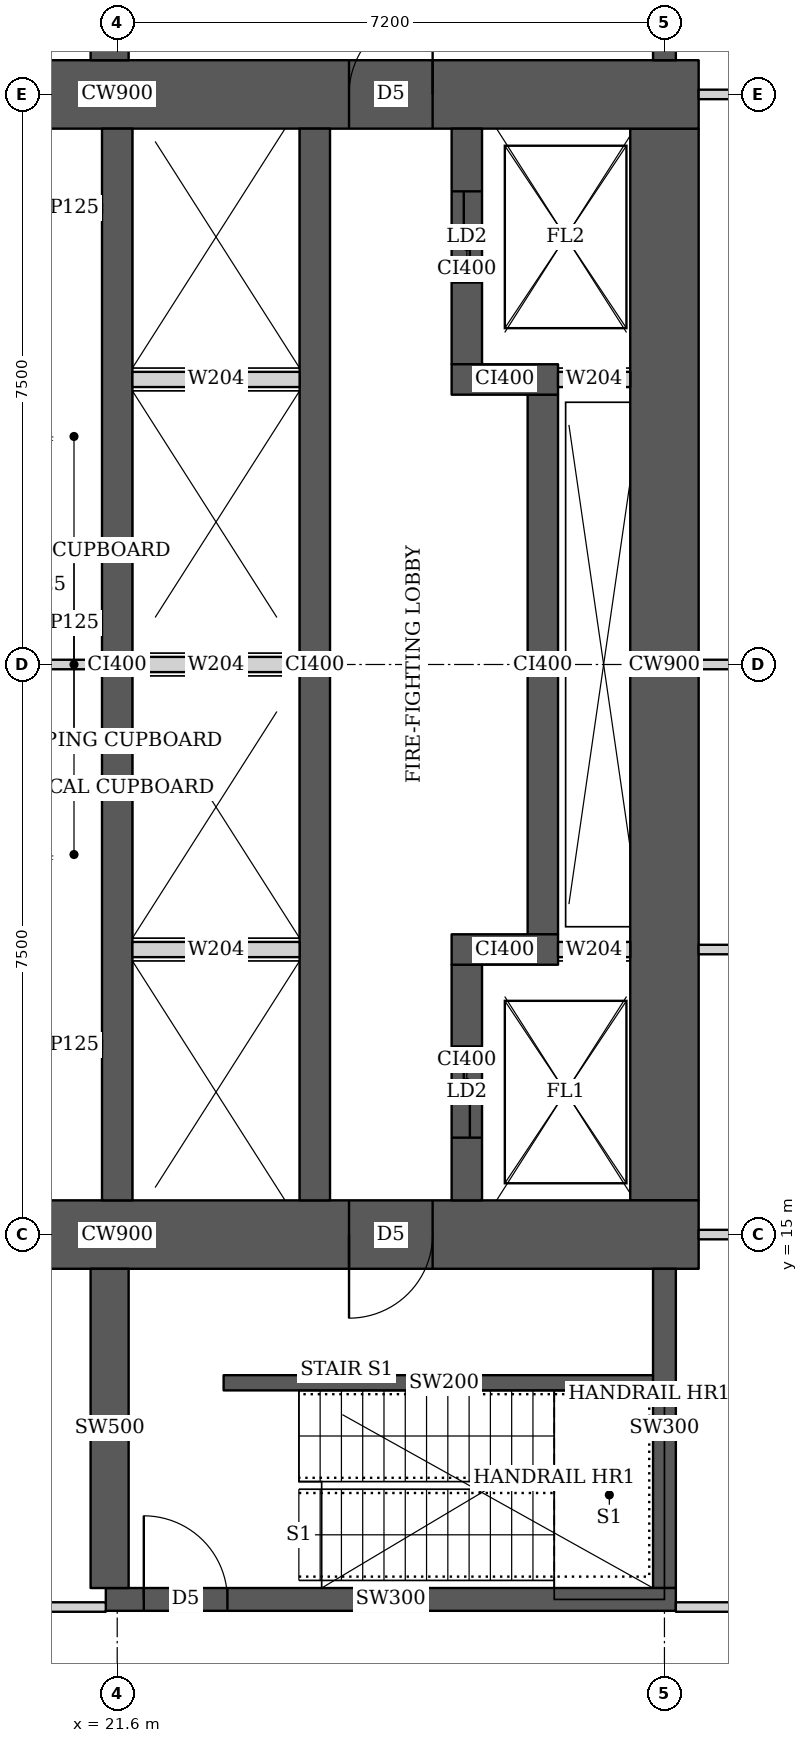
"""IFC4 building model, lengths in metres.
Left out: names, types, materials, properties, quantities, classifications, styles, units other than length and angle.
Written with IfcOpenShell. Run it as: python <this file> out.ifc"""

import sys

from ifc_helpers import new_model, si_unit, direction, frame, frame_2d, origin, place, context, subcontext, project, spatial, rectangle, extrude, element, fill, save


model = new_model("IFC4")
c1 = context("Model", 3, precision=1e-05, world=origin(), true_north=direction((0.0, 1.0)))
c2 = subcontext(c1, "Body", "Model", "MODEL_VIEW")
j1 = project(units=[si_unit("LENGTHUNIT", "METRE"), si_unit("PLANEANGLEUNIT", "RADIAN")], contexts=[c1])
p1 = place(None, origin())
s1 = spatial("IfcSite", under=j1, at=p1, CompositionType="ELEMENT")
p2 = place(p1, origin())
s2 = spatial("IfcBuilding", under=s1, at=p2, CompositionType="ELEMENT")
p3 = place(p2, frame((0.0, 0.0, 10.1)))
s3 = spatial("IfcBuildingStorey", under=s2, at=p3, CompositionType="ELEMENT", Elevation=10.1)
p4 = place(p3, frame((13.95, 15.0, 0.0), z_axis=(0.0, 0.0, 1.0), x_axis=(1.0, 0.0, 0.0)))
e1 = element("IfcWall", 1, at=p4, inside=s3, PredefinedType="SHEAR", context=c2, shape_type="SweptSolid", body=[
    extrude(rectangle(XDim=15.3, YDim=0.9, at=frame_2d((7.65, 0.0))), origin(), (0.0, 0.0, 1.0), 4.5),
])
p5 = place(p4, frame((4.45, 0.0, 0.0)))
e2 = element("IfcOpeningElement", 2, at=p5, cuts=e1, PredefinedType="OPENING", context=c2, shape_type="SweptSolid", body=[
    extrude(rectangle(XDim=1.8, YDim=2.1, at=frame_2d((0.9, 1.05))), frame((0.0, 0.46, 0.0), z_axis=(0.0, -1.0, 0.0), x_axis=(1.0, 0.0, 0.0)), (0.0, 0.0, 1.0), 0.92),
])
p6 = place(p4, frame((10.7, 0.0, 0.0)))
e3 = element("IfcOpeningElement", 3, at=p6, cuts=e1, PredefinedType="OPENING", context=c2, shape_type="SweptSolid", body=[
    extrude(rectangle(XDim=1.1, YDim=2.1, at=frame_2d((0.55, 1.05))), frame((0.0, 0.46, 0.0), z_axis=(0.0, -1.0, 0.0), x_axis=(1.0, 0.0, 0.0)), (0.0, 0.0, 1.0), 0.92),
])
p7 = place(p3, frame((13.95, 30.0, 0.0), z_axis=(0.0, 0.0, 1.0), x_axis=(1.0, 0.0, 0.0)))
e4 = element("IfcWall", 4, at=p7, inside=s3, PredefinedType="SHEAR", context=c2, shape_type="SweptSolid", body=[
    extrude(rectangle(XDim=15.3, YDim=0.9, at=frame_2d((7.65, 0.0))), origin(), (0.0, 0.0, 1.0), 4.5),
])
p8 = place(p7, frame((4.45, 0.0, 0.0)))
e5 = element("IfcOpeningElement", 5, at=p8, cuts=e4, PredefinedType="OPENING", context=c2, shape_type="SweptSolid", body=[
    extrude(rectangle(XDim=1.8, YDim=2.1, at=frame_2d((0.9, 1.05))), frame((0.0, 0.46, 0.0), z_axis=(0.0, -1.0, 0.0), x_axis=(1.0, 0.0, 0.0)), (0.0, 0.0, 1.0), 0.92),
])
p9 = place(p7, frame((10.7, 0.0, 0.0)))
e6 = element("IfcOpeningElement", 6, at=p9, cuts=e4, PredefinedType="OPENING", context=c2, shape_type="SweptSolid", body=[
    extrude(rectangle(XDim=1.1, YDim=2.1, at=frame_2d((0.55, 1.05))), frame((0.0, 0.46, 0.0), z_axis=(0.0, -1.0, 0.0), x_axis=(1.0, 0.0, 0.0)), (0.0, 0.0, 1.0), 0.92),
])
p10 = place(p3, frame((28.8, 15.45, 0.0), z_axis=(0.0, 0.0, 1.0), x_axis=(0.0, 1.0, 0.0)))
e7 = element("IfcWall", 7, at=p10, inside=s3, PredefinedType="SHEAR", context=c2, shape_type="SweptSolid", body=[
    extrude(rectangle(XDim=14.1, YDim=0.9, at=frame_2d((7.05, 0.0))), origin(), (0.0, 0.0, 1.0), 4.5),
])
for number, where, z_axis, x_axis in (
    (8, (21.6, 15.45, 0.0), (0.0, 0.0, 1.0), (0.0, 1.0, 0.0)),
    (9, (24.2, 15.45, 0.0), (0.0, 0.0, 1.0), (0.0, 1.0, 0.0)),
):
    element("IfcWall", number, at=place(p3, frame(where, z_axis=z_axis, x_axis=x_axis)), inside=s3, PredefinedType="SHEAR", context=c2, shape_type="SweptSolid", body=[
        extrude(rectangle(XDim=14.1, YDim=0.4, at=frame_2d((7.05, 0.0))), origin(), (0.0, 0.0, 1.0), 4.5),
    ])
p11 = place(p3, frame((26.2, 15.45, 0.0), z_axis=(0.0, 0.0, 1.0), x_axis=(0.0, 1.0, 0.0)))
e10 = element("IfcWall", 10, at=p11, inside=s3, PredefinedType="SHEAR", context=c2, shape_type="SweptSolid", body=[
    extrude(rectangle(XDim=3.1, YDim=0.4, at=frame_2d((1.55, 0.0))), origin(), (0.0, 0.0, 1.0), 4.5),
])
p12 = place(p11, frame((0.825, 0.0, 0.0)))
e11 = element("IfcOpeningElement", 11, at=p12, cuts=e10, PredefinedType="OPENING", context=c2, shape_type="SweptSolid", body=[
    extrude(rectangle(XDim=1.2, YDim=2.1, at=frame_2d((0.6, 1.05))), frame((0.0, 0.21, 0.0), z_axis=(0.0, -1.0, 0.0), x_axis=(1.0, 0.0, 0.0)), (0.0, 0.0, 1.0), 0.42),
])
p13 = place(p3, frame((26.0, 18.75, 0.0), z_axis=(0.0, 0.0, 1.0), x_axis=(1.0, 0.0, 0.0)))
e12 = element("IfcWall", 12, at=p13, inside=s3, PredefinedType="SHEAR", context=c2, shape_type="SweptSolid", body=[
    extrude(rectangle(XDim=1.4, YDim=0.4, at=frame_2d((0.7, 0.0))), origin(), (0.0, 0.0, 1.0), 4.5),
])
p14 = place(p3, frame((27.2, 18.95, 0.0), z_axis=(0.0, 0.0, 1.0), x_axis=(0.0, 1.0, 0.0)))
e13 = element("IfcWall", 13, at=p14, inside=s3, PredefinedType="SHEAR", context=c2, shape_type="SweptSolid", body=[
    extrude(rectangle(XDim=7.1, YDim=0.4, at=frame_2d((3.55, 0.0))), origin(), (0.0, 0.0, 1.0), 4.5),
])
p15 = place(p3, frame((26.0, 26.25, 0.0), z_axis=(0.0, 0.0, 1.0), x_axis=(1.0, 0.0, 0.0)))
e14 = element("IfcWall", 14, at=p15, inside=s3, PredefinedType="SHEAR", context=c2, shape_type="SweptSolid", body=[
    extrude(rectangle(XDim=1.4, YDim=0.4, at=frame_2d((0.7, 0.0))), origin(), (0.0, 0.0, 1.0), 4.5),
])
p16 = place(p3, frame((26.2, 26.45, 0.0), z_axis=(0.0, 0.0, 1.0), x_axis=(0.0, 1.0, 0.0)))
e15 = element("IfcWall", 15, at=p16, inside=s3, PredefinedType="SHEAR", context=c2, shape_type="SweptSolid", body=[
    extrude(rectangle(XDim=3.1, YDim=0.4, at=frame_2d((1.55, 0.0))), origin(), (0.0, 0.0, 1.0), 4.5),
])
p17 = place(p16, frame((1.075, 0.0, 0.0)))
e16 = element("IfcOpeningElement", 16, at=p17, cuts=e15, PredefinedType="OPENING", context=c2, shape_type="SweptSolid", body=[
    extrude(rectangle(XDim=1.2, YDim=2.1, at=frame_2d((0.6, 1.05))), frame((0.0, 0.21, 0.0), z_axis=(0.0, -1.0, 0.0), x_axis=(1.0, 0.0, 0.0)), (0.0, 0.0, 1.0), 0.42),
])
p18 = place(p3, frame((21.45, 10.2, 0.0), z_axis=(0.0, 0.0, 1.0), x_axis=(1.0, 0.0, 0.0)))
e17 = element("IfcWall", 17, at=p18, inside=s3, PredefinedType="SHEAR", context=c2, shape_type="SweptSolid", body=[
    extrude(rectangle(XDim=7.5, YDim=0.3, at=frame_2d((3.75, 0.0))), origin(), (0.0, 0.0, 1.0), 4.5),
])
p19 = place(p18, frame((0.5, 0.0, 0.0)))
e18 = element("IfcOpeningElement", 18, at=p19, cuts=e17, PredefinedType="OPENING", context=c2, shape_type="SweptSolid", body=[
    extrude(rectangle(XDim=1.1, YDim=2.1, at=frame_2d((0.55, 1.05))), frame((0.0, 0.16, 0.0), z_axis=(0.0, -1.0, 0.0), x_axis=(1.0, 0.0, 0.0)), (0.0, 0.0, 1.0), 0.32),
])
p20 = place(p3, frame((21.5, 10.35, 0.0), z_axis=(0.0, 0.0, 1.0), x_axis=(0.0, 1.0, 0.0)))
e19 = element("IfcWall", 19, at=p20, inside=s3, PredefinedType="SHEAR", context=c2, shape_type="SweptSolid", body=[
    extrude(rectangle(XDim=4.2, YDim=0.5, at=frame_2d((2.1, 0.0))), origin(), (0.0, 0.0, 1.0), 4.5),
])
p21 = place(p3, frame((28.8, 10.35, 0.0), z_axis=(0.0, 0.0, 1.0), x_axis=(0.0, 1.0, 0.0)))
e20 = element("IfcWall", 20, at=p21, inside=s3, PredefinedType="SHEAR", context=c2, shape_type="SweptSolid", body=[
    extrude(rectangle(XDim=4.2, YDim=0.3, at=frame_2d((2.1, 0.0))), origin(), (0.0, 0.0, 1.0), 4.5),
])
p22 = place(p3, frame((21.5, 30.45, 0.0), z_axis=(0.0, 0.0, 1.0), x_axis=(0.0, 1.0, 0.0)))
e21 = element("IfcWall", 21, at=p22, inside=s3, PredefinedType="SHEAR", context=c2, shape_type="SweptSolid", body=[
    extrude(rectangle(XDim=4.2, YDim=0.5, at=frame_2d((2.1, 0.0))), origin(), (0.0, 0.0, 1.0), 4.5),
])
p23 = place(p3, frame((28.8, 30.45, 0.0), z_axis=(0.0, 0.0, 1.0), x_axis=(0.0, 1.0, 0.0)))
e22 = element("IfcWall", 22, at=p23, inside=s3, PredefinedType="SHEAR", context=c2, shape_type="SweptSolid", body=[
    extrude(rectangle(XDim=4.2, YDim=0.3, at=frame_2d((2.1, 0.0))), origin(), (0.0, 0.0, 1.0), 4.5),
])
p24 = place(p3, frame((10.163, 10.1, 0.0), z_axis=(0.0, 0.0, 1.0), x_axis=(1.0, 0.0, 0.0)))
e23 = element("IfcWall", 23, at=p24, inside=s3, PredefinedType="PARTITIONING", context=c2, shape_type="SweptSolid", body=[
    extrude(rectangle(XDim=11.287, YDim=0.125, at=frame_2d((5.644, 0.0))), origin(), (0.0, 0.0, 1.0), 2.2),
])
p25 = place(p24, frame((7.832, 0.0, 0.0)))
e24 = element("IfcOpeningElement", 24, at=p25, cuts=e23, PredefinedType="OPENING", context=c2, shape_type="SweptSolid", body=[
    extrude(rectangle(XDim=1.8, YDim=2.1, at=frame_2d((0.9, 1.05))), frame((0.0, 0.073, 0.0), z_axis=(0.0, -1.0, 0.0), x_axis=(1.0, 0.0, 0.0)), (0.0, 0.0, 1.0), 0.145),
])
p26 = place(p3, frame((28.95, 10.1, 0.0), z_axis=(0.0, 0.0, 1.0), x_axis=(1.0, 0.0, 0.0)))
e25 = element("IfcWall", 25, at=p26, inside=s3, PredefinedType="PARTITIONING", context=c2, shape_type="SweptSolid", body=[
    extrude(rectangle(XDim=9.188, YDim=0.125, at=frame_2d((4.594, 0.0))), origin(), (0.0, 0.0, 1.0), 2.2),
])
p27 = place(p3, frame((29.25, 15.0, 0.0), z_axis=(0.0, 0.0, 1.0), x_axis=(1.0, 0.0, 0.0)))
e26 = element("IfcWall", 26, at=p27, inside=s3, PredefinedType="PARTITIONING", context=c2, shape_type="SweptSolid", body=[
    extrude(rectangle(XDim=5.549, YDim=0.125, at=frame_2d((2.774, 0.0))), origin(), (0.0, 0.0, 1.0), 4.2),
])
p28 = place(p3, frame((29.25, 22.5, 0.0), z_axis=(0.0, 0.0, 1.0), x_axis=(1.0, 0.0, 0.0)))
e27 = element("IfcWall", 27, at=p28, inside=s3, PredefinedType="PARTITIONING", context=c2, shape_type="SweptSolid", body=[
    extrude(rectangle(XDim=2.549, YDim=0.125, at=frame_2d((1.274, 0.0))), origin(), (0.0, 0.0, 1.0), 2.6),
])
p29 = place(p3, frame((29.25, 30.0, 0.0), z_axis=(0.0, 0.0, 1.0), x_axis=(1.0, 0.0, 0.0)))
e28 = element("IfcWall", 28, at=p29, inside=s3, PredefinedType="PARTITIONING", context=c2, shape_type="SweptSolid", body=[
    extrude(rectangle(XDim=2.549, YDim=0.125, at=frame_2d((1.274, 0.0))), origin(), (0.0, 0.0, 1.0), 4.2),
])
p30 = place(p3, frame((29.25, 18.75, 0.0), z_axis=(0.0, 0.0, 1.0), x_axis=(1.0, 0.0, 0.0)))
e29 = element("IfcWall", 29, at=p30, inside=s3, PredefinedType="PARTITIONING", context=c2, shape_type="SweptSolid", body=[
    extrude(rectangle(XDim=7.255, YDim=0.125, at=frame_2d((3.627, 0.0))), origin(), (0.0, 0.0, 1.0), 4.2),
])
for number, where, z_axis, x_axis in (
    (30, (20.663, 17.5, 0.0), (0.0, 0.0, 1.0), (1.0, 0.0, 0.0)),
    (31, (20.663, 28.5, 0.0), (0.0, 0.0, 1.0), (1.0, 0.0, 0.0)),
    (32, (20.663, 22.5, 0.0), (0.0, 0.0, 1.0), (1.0, 0.0, 0.0)),
):
    element("IfcWall", number, at=place(p3, frame(where, z_axis=z_axis, x_axis=x_axis)), inside=s3, PredefinedType="PARTITIONING", context=c2, shape_type="SweptSolid", body=[
        extrude(rectangle(XDim=0.737, YDim=0.125, at=frame_2d((0.368, 0.0))), origin(), (0.0, 0.0, 1.0), 4.2),
    ])
p31 = place(p3, frame((23.0, 13.05, 0.0), z_axis=(0.0, 0.0, 1.0), x_axis=(1.0, 0.0, 0.0)))
e33 = element("IfcWall", 33, at=p31, inside=s3, PredefinedType="SHEAR", context=c2, shape_type="SweptSolid", body=[
    extrude(rectangle(XDim=5.8, YDim=0.2, at=frame_2d((2.9, 0.0))), origin(), (0.0, 0.0, 1.0), 4.5),
])
for number, where, z_axis, x_axis in (
    (34, (21.8, 18.75, 0.0), (0.0, 0.0, 1.0), (1.0, 0.0, 0.0)),
    (35, (21.8, 22.5, 0.0), (0.0, 0.0, 1.0), (1.0, 0.0, 0.0)),
    (36, (21.8, 26.25, 0.0), (0.0, 0.0, 1.0), (1.0, 0.0, 0.0)),
):
    element("IfcWall", number, at=place(p3, frame(where, z_axis=z_axis, x_axis=x_axis)), inside=s3, PredefinedType="SOLIDWALL", context=c2, shape_type="SweptSolid", body=[
        extrude(rectangle(XDim=2.2, YDim=0.2, at=frame_2d((1.1, 0.0))), origin(), (0.0, 0.0, 1.0), 4.2),
    ])
for number, where, z_axis, x_axis in (
    (37, (27.4, 18.75, 0.0), (0.0, 0.0, 1.0), (1.0, 0.0, 0.0)),
    (38, (27.4, 26.25, 0.0), (0.0, 0.0, 1.0), (1.0, 0.0, 0.0)),
):
    element("IfcWall", number, at=place(p3, frame(where, z_axis=z_axis, x_axis=x_axis)), inside=s3, PredefinedType="SOLIDWALL", context=c2, shape_type="SweptSolid", body=[
        extrude(rectangle(XDim=0.95, YDim=0.2, at=frame_2d((0.475, 0.0))), origin(), (0.0, 0.0, 1.0), 4.2),
    ])
p32 = place(p6, origin())
e39 = element("IfcDoor", 39, at=p32, inside=s3, OperationType="SINGLE_SWING_RIGHT", PredefinedType="DOOR", context=c2, shape_type="SweptSolid", body=[
    extrude(rectangle(XDim=1.1, YDim=2.1, at=frame_2d((0.55, 1.05))), frame((0.0, 0.025, 0.0), z_axis=(0.0, -1.0, 0.0), x_axis=(1.0, 0.0, 0.0)), (0.0, 0.0, 1.0), 0.05),
])
fill(e3, e39)
p33 = place(p9, origin())
e40 = element("IfcDoor", 40, at=p33, inside=s3, OperationType="SINGLE_SWING_RIGHT", PredefinedType="DOOR", context=c2, shape_type="SweptSolid", body=[
    extrude(rectangle(XDim=1.1, YDim=2.1, at=frame_2d((0.55, 1.05))), frame((0.0, 0.025, 0.0), z_axis=(0.0, -1.0, 0.0), x_axis=(1.0, 0.0, 0.0)), (0.0, 0.0, 1.0), 0.05),
])
fill(e6, e40)
p34 = place(p12, origin())
e41 = element("IfcDoor", 41, at=p34, inside=s3, OperationType="DOUBLE_DOOR_SLIDING", PredefinedType="DOOR", context=c2, shape_type="SweptSolid", body=[
    extrude(rectangle(XDim=1.2, YDim=2.1, at=frame_2d((0.6, 1.05))), frame((0.0, 0.025, 0.0), z_axis=(0.0, -1.0, 0.0), x_axis=(1.0, 0.0, 0.0)), (0.0, 0.0, 1.0), 0.05),
])
fill(e11, e41)
p35 = place(p17, origin())
e42 = element("IfcDoor", 42, at=p35, inside=s3, OperationType="DOUBLE_DOOR_SLIDING", PredefinedType="DOOR", context=c2, shape_type="SweptSolid", body=[
    extrude(rectangle(XDim=1.2, YDim=2.1, at=frame_2d((0.6, 1.05))), frame((0.0, 0.025, 0.0), z_axis=(0.0, -1.0, 0.0), x_axis=(1.0, 0.0, 0.0)), (0.0, 0.0, 1.0), 0.05),
])
fill(e16, e42)
p36 = place(p19, origin())
e43 = element("IfcDoor", 43, at=p36, inside=s3, OperationType="SINGLE_SWING_LEFT", PredefinedType="DOOR", context=c2, shape_type="SweptSolid", body=[
    extrude(rectangle(XDim=1.1, YDim=2.1, at=frame_2d((0.55, 1.05))), frame((0.0, 0.025, 0.0), z_axis=(0.0, -1.0, 0.0), x_axis=(1.0, 0.0, 0.0)), (0.0, 0.0, 1.0), 0.05),
])
fill(e18, e43)
save(model, sys.argv[1])
